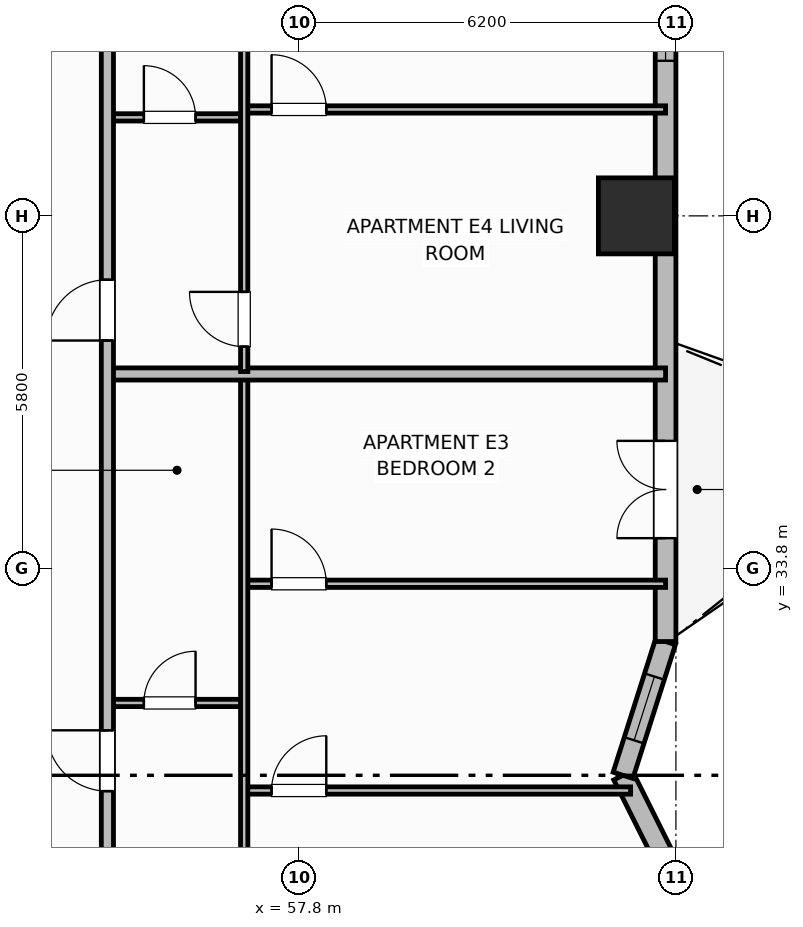
"""IFC4 building model, lengths in metres.
Left out: names, types, materials, properties, quantities, classifications, styles, units other than length and angle.
Written with IfcOpenShell. Run it as: python <this file> out.ifc"""

import sys

from ifc_helpers import new_model, si_unit, direction, frame, frame_2d, origin, origin_2d, place, context, subcontext, project, spatial, rectangle, extrude, element, fill, save


model = new_model("IFC4")
c1 = context("Model", 3, precision=1e-05, world=origin(), true_north=direction((0.0, 1.0)))
c2 = subcontext(c1, "Body", "Model", "MODEL_VIEW")
j1 = project(units=[si_unit("LENGTHUNIT", "METRE"), si_unit("PLANEANGLEUNIT", "RADIAN")], contexts=[c1])
p1 = place(None, origin())
s1 = spatial("IfcSite", under=j1, at=p1, CompositionType="ELEMENT")
p2 = place(p1, origin())
s2 = spatial("IfcBuilding", under=s1, at=p2, CompositionType="ELEMENT")
p3 = place(p2, frame((0.0, 0.0, 65.8)))
s3 = spatial("IfcBuildingStorey", under=s2, at=p3, CompositionType="ELEMENT", Elevation=65.8)
p4 = place(p3, frame((63.35, 39.6, 0.0), z_axis=(0.0, 0.0, 1.0), x_axis=(1.0, 0.0, 0.0)))
e1 = element("IfcColumn", 1, at=p4, inside=s3, PredefinedType="COLUMN", context=c2, shape_type="SweptSolid", body=[
    extrude(rectangle(XDim=1.25, YDim=1.25, at=origin_2d()), origin(), (0.0, 0.0, 1.0), 3.7),
])
p5 = place(p3, frame((63.83, 29.0, 0.0), z_axis=(0.0, 0.0, 1.0), x_axis=(-0.447338371726, 0.894364792007, 0.0)))
e2 = element("IfcWall", 2, at=p5, inside=s3, PredefinedType="SOLIDWALL", context=c2, shape_type="SweptSolid", body=[
    extrude(rectangle(XDim=1.565, YDim=0.34, at=frame_2d((0.783, 0.0))), origin(), (0.0, 0.0, 1.0), 2.7),
])
p6 = place(p3, frame((63.13, 30.4, 0.0), z_axis=(0.0, 0.0, 1.0), x_axis=(0.303256029766, 0.952909114454, 0.0)))
e3 = element("IfcWall", 3, at=p6, inside=s3, PredefinedType="SOLIDWALL", context=c2, shape_type="SweptSolid", body=[
    extrude(rectangle(XDim=2.309, YDim=0.34, at=frame_2d((1.154, 0.0))), origin(), (0.0, 0.0, 1.0), 2.7),
])
p7 = place(p6, frame((0.604, 0.0, 0.89)))
e4 = element("IfcOpeningElement", 4, at=p7, cuts=e3, PredefinedType="OPENING", context=c2, shape_type="SweptSolid", body=[
    extrude(rectangle(XDim=1.1, YDim=1.65, at=frame_2d((0.55, 0.825))), frame((0.0, 0.18, 0.0), z_axis=(0.0, -1.0, 0.0), x_axis=(1.0, 0.0, 0.0)), (0.0, 0.0, 1.0), 0.36),
])
p8 = place(p3, frame((63.83, 32.6, 0.0), z_axis=(0.0, 0.0, 1.0), x_axis=(0.0, 1.0, 0.0)))
e5 = element("IfcWall", 5, at=p8, inside=s3, PredefinedType="SOLIDWALL", context=c2, shape_type="SweptSolid", body=[
    extrude(rectangle(XDim=14.8, YDim=0.34, at=frame_2d((7.4, 0.0))), origin(), (0.0, 0.0, 1.0), 2.7),
])
p9 = place(p8, frame((1.7, 0.0, 0.0)))
e6 = element("IfcOpeningElement", 6, at=p9, cuts=e5, PredefinedType="OPENING", context=c2, shape_type="SweptSolid", body=[
    extrude(rectangle(XDim=1.6, YDim=2.1, at=frame_2d((0.8, 1.05))), frame((0.0, 0.18, 0.0), z_axis=(0.0, -1.0, 0.0), x_axis=(1.0, 0.0, 0.0)), (0.0, 0.0, 1.0), 0.36),
])
p10 = place(p8, frame((9.55, 0.0, 0.93)))
e7 = element("IfcOpeningElement", 7, at=p10, cuts=e5, PredefinedType="OPENING", context=c2, shape_type="SweptSolid", body=[
    extrude(rectangle(XDim=1.1, YDim=1.65, at=frame_2d((0.55, 0.825))), frame((0.0, 0.18, 0.0), z_axis=(0.0, -1.0, 0.0), x_axis=(1.0, 0.0, 0.0)), (0.0, 0.0, 1.0), 0.36),
])
p11 = place(p3, frame((54.65, 31.59, 0.0), z_axis=(0.0, 0.0, 1.0), x_axis=(1.0, 0.0, 0.0)))
e8 = element("IfcWall", 8, at=p11, inside=s3, PredefinedType="PARTITIONING", context=c2, shape_type="SweptSolid", body=[
    extrude(rectangle(XDim=2.25, YDim=0.12, at=frame_2d((1.125, 0.0))), origin(), (0.0, 0.0, 1.0), 2.53),
])
p12 = place(p11, frame((0.6, 0.0, 0.0)))
e9 = element("IfcOpeningElement", 9, at=p12, cuts=e8, PredefinedType="OPENING", context=c2, shape_type="SweptSolid", body=[
    extrude(rectangle(XDim=0.85, YDim=2.1, at=frame_2d((0.425, 1.05))), frame((0.0, 0.07, 0.0), z_axis=(0.0, -1.0, 0.0), x_axis=(1.0, 0.0, 0.0)), (0.0, 0.0, 1.0), 0.14),
])
p13 = place(p3, frame((56.9, 30.15, 0.0), z_axis=(0.0, 0.0, 1.0), x_axis=(1.0, 0.0, 0.0)))
e10 = element("IfcWall", 10, at=p13, inside=s3, PredefinedType="PARTITIONING", context=c2, shape_type="SweptSolid", body=[
    extrude(rectangle(XDim=6.355, YDim=0.12, at=frame_2d((3.177, 0.0))), origin(), (0.0, 0.0, 1.0), 2.53),
])
p14 = place(p13, frame((0.45, 0.0, 0.0)))
e11 = element("IfcOpeningElement", 11, at=p14, cuts=e10, PredefinedType="OPENING", context=c2, shape_type="SweptSolid", body=[
    extrude(rectangle(XDim=0.9, YDim=2.1, at=frame_2d((0.45, 1.05))), frame((0.0, 0.07, 0.0), z_axis=(0.0, -1.0, 0.0), x_axis=(1.0, 0.0, 0.0)), (0.0, 0.0, 1.0), 0.14),
])
p15 = place(p3, frame((56.9, 33.55, 0.0), z_axis=(0.0, 0.0, 1.0), x_axis=(1.0, 0.0, 0.0)))
e12 = element("IfcWall", 12, at=p15, inside=s3, PredefinedType="PARTITIONING", context=c2, shape_type="SweptSolid", body=[
    extrude(rectangle(XDim=6.93, YDim=0.12, at=frame_2d((3.465, 0.0))), origin(), (0.0, 0.0, 1.0), 2.53),
])
p16 = place(p15, frame((0.45, 0.0, 0.0)))
e13 = element("IfcOpeningElement", 13, at=p16, cuts=e12, PredefinedType="OPENING", context=c2, shape_type="SweptSolid", body=[
    extrude(rectangle(XDim=0.9, YDim=2.1, at=frame_2d((0.45, 1.05))), frame((0.0, 0.07, 0.0), z_axis=(0.0, -1.0, 0.0), x_axis=(1.0, 0.0, 0.0)), (0.0, 0.0, 1.0), 0.14),
])
p17 = place(p3, frame((56.9, 26.64, 0.0), z_axis=(0.0, 0.0, 1.0), x_axis=(0.0, 1.0, 0.0)))
e14 = element("IfcWall", 14, at=p17, inside=s3, PredefinedType="PARTITIONING", context=c2, shape_type="SweptSolid", body=[
    extrude(rectangle(XDim=10.32, YDim=0.12, at=frame_2d((5.16, 0.0))), origin(), (0.0, 0.0, 1.0), 2.53),
])
p18 = place(p17, frame((0.56, 0.0, 0.0)))
e15 = element("IfcOpeningElement", 15, at=p18, cuts=e14, PredefinedType="OPENING", context=c2, shape_type="SweptSolid", body=[
    extrude(rectangle(XDim=0.9, YDim=2.1, at=frame_2d((0.45, 1.05))), frame((0.0, 0.07, 0.0), z_axis=(0.0, -1.0, 0.0), x_axis=(1.0, 0.0, 0.0)), (0.0, 0.0, 1.0), 0.14),
])
p19 = place(p3, frame((54.65, 37.0, 0.0), z_axis=(0.0, 0.0, 1.0), x_axis=(1.0, 0.0, 0.0)))
e16 = element("IfcWall", 16, at=p19, inside=s3, PredefinedType="PARTITIONING", context=c2, shape_type="SweptSolid", body=[
    extrude(rectangle(XDim=9.18, YDim=0.2, at=frame_2d((4.59, 0.0))), origin(), (0.0, 0.0, 1.0), 2.53),
])
p20 = place(p3, frame((54.65, 41.22, 0.0), z_axis=(0.0, 0.0, 1.0), x_axis=(1.0, 0.0, 0.0)))
e17 = element("IfcWall", 17, at=p20, inside=s3, PredefinedType="PARTITIONING", context=c2, shape_type="SweptSolid", body=[
    extrude(rectangle(XDim=2.25, YDim=0.12, at=frame_2d((1.125, 0.0))), origin(), (0.0, 0.0, 1.0), 2.53),
])
p21 = place(p20, frame((0.6, 0.0, 0.0)))
e18 = element("IfcOpeningElement", 18, at=p21, cuts=e17, PredefinedType="OPENING", context=c2, shape_type="SweptSolid", body=[
    extrude(rectangle(XDim=0.85, YDim=2.1, at=frame_2d((0.425, 1.05))), frame((0.0, 0.07, 0.0), z_axis=(0.0, -1.0, 0.0), x_axis=(1.0, 0.0, 0.0)), (0.0, 0.0, 1.0), 0.14),
])
p22 = place(p3, frame((56.9, 41.35, 0.0), z_axis=(0.0, 0.0, 1.0), x_axis=(1.0, 0.0, 0.0)))
e19 = element("IfcWall", 19, at=p22, inside=s3, PredefinedType="PARTITIONING", context=c2, shape_type="SweptSolid", body=[
    extrude(rectangle(XDim=6.93, YDim=0.12, at=frame_2d((3.465, 0.0))), origin(), (0.0, 0.0, 1.0), 2.53),
])
p23 = place(p22, frame((0.45, 0.0, 0.0)))
e20 = element("IfcOpeningElement", 20, at=p23, cuts=e19, PredefinedType="OPENING", context=c2, shape_type="SweptSolid", body=[
    extrude(rectangle(XDim=0.9, YDim=2.1, at=frame_2d((0.45, 1.05))), frame((0.0, 0.07, 0.0), z_axis=(0.0, -1.0, 0.0), x_axis=(1.0, 0.0, 0.0)), (0.0, 0.0, 1.0), 0.14),
])
p24 = place(p3, frame((56.9, 37.04, 0.0), z_axis=(0.0, 0.0, 1.0), x_axis=(0.0, 1.0, 0.0)))
e21 = element("IfcWall", 21, at=p24, inside=s3, PredefinedType="PARTITIONING", context=c2, shape_type="SweptSolid", body=[
    extrude(rectangle(XDim=8.72, YDim=0.12, at=frame_2d((4.36, 0.0))), origin(), (0.0, 0.0, 1.0), 2.53),
])
p25 = place(p24, frame((0.41, 0.0, 0.0)))
e22 = element("IfcOpeningElement", 22, at=p25, cuts=e21, PredefinedType="OPENING", context=c2, shape_type="SweptSolid", body=[
    extrude(rectangle(XDim=0.9, YDim=2.1, at=frame_2d((0.45, 1.05))), frame((0.0, 0.07, 0.0), z_axis=(0.0, -1.0, 0.0), x_axis=(1.0, 0.0, 0.0)), (0.0, 0.0, 1.0), 0.14),
])
p26 = place(p3, frame((54.65, 10.6, 0.0), z_axis=(0.0, 0.0, 1.0), x_axis=(0.0, 1.0, 0.0)))
e23 = element("IfcWall", 23, at=p26, inside=s3, PredefinedType="PARTITIONING", context=c2, shape_type="SweptSolid", body=[
    extrude(rectangle(XDim=35.2, YDim=0.2, at=frame_2d((17.6, 0.0))), origin(), (0.0, 0.0, 1.0), 2.53),
])
p27 = place(p26, frame((2.65, 0.0, 0.0)))
e24 = element("IfcOpeningElement", 24, at=p27, cuts=e23, PredefinedType="OPENING", context=c2, shape_type="SweptSolid", body=[
    extrude(rectangle(XDim=1.0, YDim=2.15, at=frame_2d((0.5, 1.075))), frame((0.0, 0.11, 0.0), z_axis=(0.0, -1.0, 0.0), x_axis=(1.0, 0.0, 0.0)), (0.0, 0.0, 1.0), 0.22),
])
p28 = place(p26, frame((10.81, 0.0, 0.0)))
e25 = element("IfcOpeningElement", 25, at=p28, cuts=e23, PredefinedType="OPENING", context=c2, shape_type="SweptSolid", body=[
    extrude(rectangle(XDim=1.0, YDim=2.15, at=frame_2d((0.5, 1.075))), frame((0.0, 0.11, 0.0), z_axis=(0.0, -1.0, 0.0), x_axis=(1.0, 0.0, 0.0)), (0.0, 0.0, 1.0), 0.22),
])
p29 = place(p26, frame((19.54, 0.0, 0.0)))
e26 = element("IfcOpeningElement", 26, at=p29, cuts=e23, PredefinedType="OPENING", context=c2, shape_type="SweptSolid", body=[
    extrude(rectangle(XDim=1.0, YDim=2.15, at=frame_2d((0.5, 1.075))), frame((0.0, 0.11, 0.0), z_axis=(0.0, -1.0, 0.0), x_axis=(1.0, 0.0, 0.0)), (0.0, 0.0, 1.0), 0.22),
])
p30 = place(p26, frame((26.95, 0.0, 0.0)))
e27 = element("IfcOpeningElement", 27, at=p30, cuts=e23, PredefinedType="OPENING", context=c2, shape_type="SweptSolid", body=[
    extrude(rectangle(XDim=1.0, YDim=2.15, at=frame_2d((0.5, 1.075))), frame((0.0, 0.11, 0.0), z_axis=(0.0, -1.0, 0.0), x_axis=(1.0, 0.0, 0.0)), (0.0, 0.0, 1.0), 0.22),
])
p31 = place(p7, origin())
e28 = element("IfcWindow", 28, at=p31, inside=s3, PartitioningType="SINGLE_PANEL", PredefinedType="WINDOW", context=c2, shape_type="SweptSolid", body=[
    extrude(rectangle(XDim=1.1, YDim=1.65, at=frame_2d((0.55, 0.825))), frame((0.0, 0.03, 0.0), z_axis=(0.0, -1.0, 0.0), x_axis=(1.0, 0.0, 0.0)), (0.0, 0.0, 1.0), 0.06),
])
fill(e4, e28)
p32 = place(p9, origin())
e29 = element("IfcDoor", 29, at=p32, inside=s3, OperationType="DOUBLE_DOOR_SINGLE_SWING", PredefinedType="DOOR", context=c2, shape_type="SweptSolid", body=[
    extrude(rectangle(XDim=1.6, YDim=2.1, at=frame_2d((0.8, 1.05))), frame((0.0, 0.025, 0.0), z_axis=(0.0, -1.0, 0.0), x_axis=(1.0, 0.0, 0.0)), (0.0, 0.0, 1.0), 0.05),
])
fill(e6, e29)
p33 = place(p10, origin())
e30 = element("IfcWindow", 30, at=p33, inside=s3, PartitioningType="SINGLE_PANEL", PredefinedType="WINDOW", context=c2, shape_type="SweptSolid", body=[
    extrude(rectangle(XDim=1.1, YDim=1.65, at=frame_2d((0.55, 0.825))), frame((0.0, 0.03, 0.0), z_axis=(0.0, -1.0, 0.0), x_axis=(1.0, 0.0, 0.0)), (0.0, 0.0, 1.0), 0.06),
])
fill(e7, e30)
p34 = place(p12, origin())
e31 = element("IfcDoor", 31, at=p34, inside=s3, OperationType="SINGLE_SWING_RIGHT", PredefinedType="DOOR", context=c2, shape_type="SweptSolid", body=[
    extrude(rectangle(XDim=0.85, YDim=2.1, at=frame_2d((0.425, 1.05))), frame((0.0, 0.025, 0.0), z_axis=(0.0, -1.0, 0.0), x_axis=(1.0, 0.0, 0.0)), (0.0, 0.0, 1.0), 0.05),
])
fill(e9, e31)
p35 = place(p14, origin())
e32 = element("IfcDoor", 32, at=p35, inside=s3, OperationType="SINGLE_SWING_RIGHT", PredefinedType="DOOR", context=c2, shape_type="SweptSolid", body=[
    extrude(rectangle(XDim=0.9, YDim=2.1, at=frame_2d((0.45, 1.05))), frame((0.0, 0.025, 0.0), z_axis=(0.0, -1.0, 0.0), x_axis=(1.0, 0.0, 0.0)), (0.0, 0.0, 1.0), 0.05),
])
fill(e11, e32)
p36 = place(p16, origin())
e33 = element("IfcDoor", 33, at=p36, inside=s3, OperationType="SINGLE_SWING_LEFT", PredefinedType="DOOR", context=c2, shape_type="SweptSolid", body=[
    extrude(rectangle(XDim=0.9, YDim=2.1, at=frame_2d((0.45, 1.05))), frame((0.0, 0.025, 0.0), z_axis=(0.0, -1.0, 0.0), x_axis=(1.0, 0.0, 0.0)), (0.0, 0.0, 1.0), 0.05),
])
fill(e13, e33)
p37 = place(p21, origin())
e34 = element("IfcDoor", 34, at=p37, inside=s3, OperationType="SINGLE_SWING_LEFT", PredefinedType="DOOR", context=c2, shape_type="SweptSolid", body=[
    extrude(rectangle(XDim=0.85, YDim=2.1, at=frame_2d((0.425, 1.05))), frame((0.0, 0.025, 0.0), z_axis=(0.0, -1.0, 0.0), x_axis=(1.0, 0.0, 0.0)), (0.0, 0.0, 1.0), 0.05),
])
fill(e18, e34)
p38 = place(p23, origin())
e35 = element("IfcDoor", 35, at=p38, inside=s3, OperationType="SINGLE_SWING_LEFT", PredefinedType="DOOR", context=c2, shape_type="SweptSolid", body=[
    extrude(rectangle(XDim=0.9, YDim=2.1, at=frame_2d((0.45, 1.05))), frame((0.0, 0.025, 0.0), z_axis=(0.0, -1.0, 0.0), x_axis=(1.0, 0.0, 0.0)), (0.0, 0.0, 1.0), 0.05),
])
fill(e20, e35)
p39 = place(p25, origin())
e36 = element("IfcDoor", 36, at=p39, inside=s3, OperationType="SINGLE_SWING_RIGHT", PredefinedType="DOOR", context=c2, shape_type="SweptSolid", body=[
    extrude(rectangle(XDim=0.9, YDim=2.1, at=frame_2d((0.45, 1.05))), frame((0.0, 0.025, 0.0), z_axis=(0.0, -1.0, 0.0), x_axis=(1.0, 0.0, 0.0)), (0.0, 0.0, 1.0), 0.05),
])
fill(e22, e36)
p40 = place(p29, origin())
e37 = element("IfcDoor", 37, at=p40, inside=s3, OperationType="SINGLE_SWING_RIGHT", PredefinedType="DOOR", context=c2, shape_type="SweptSolid", body=[
    extrude(rectangle(XDim=1.0, YDim=2.15, at=frame_2d((0.5, 1.075))), frame((0.0, 0.025, 0.0), z_axis=(0.0, -1.0, 0.0), x_axis=(1.0, 0.0, 0.0)), (0.0, 0.0, 1.0), 0.05),
])
fill(e26, e37)
p41 = place(p30, origin())
e38 = element("IfcDoor", 38, at=p41, inside=s3, OperationType="SINGLE_SWING_LEFT", PredefinedType="DOOR", context=c2, shape_type="SweptSolid", body=[
    extrude(rectangle(XDim=1.0, YDim=2.15, at=frame_2d((0.5, 1.075))), frame((0.0, 0.025, 0.0), z_axis=(0.0, -1.0, 0.0), x_axis=(1.0, 0.0, 0.0)), (0.0, 0.0, 1.0), 0.05),
])
fill(e27, e38)
save(model, sys.argv[1])
